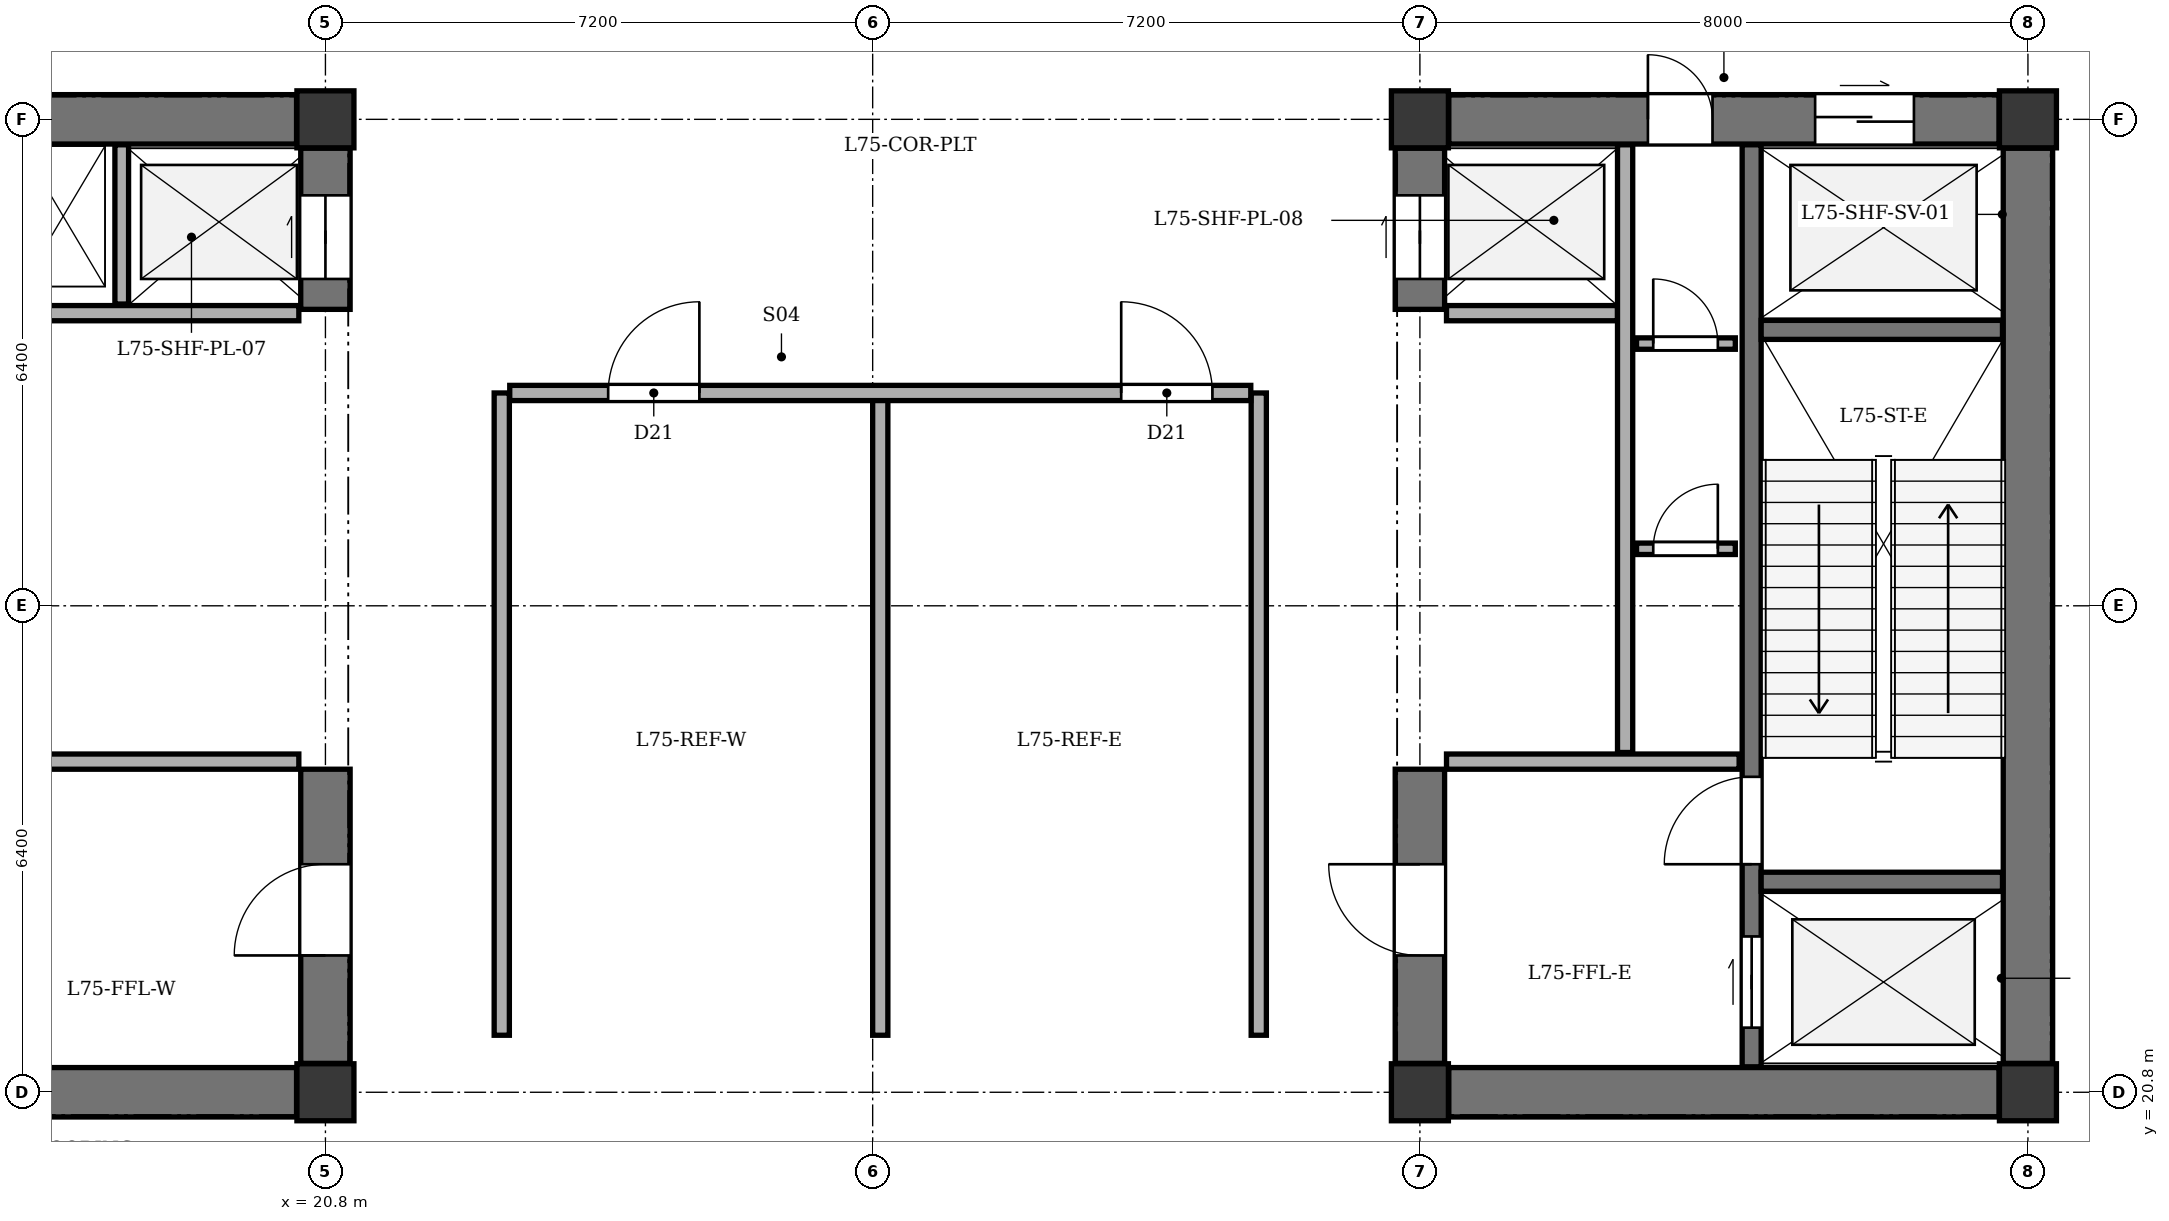
"""IFC4 building model, lengths in metres.
Left out: names, types, materials, properties, quantities, classifications, styles, units other than length and angle.
Written with IfcOpenShell. Run it as: python <this file> out.ifc"""

import sys

from ifc_helpers import new_model, si_unit, direction, frame, frame_2d, origin, origin_2d, place, context, subcontext, project, spatial, rectangle, extrude, element, fill, save


model = new_model("IFC4")
c1 = context("Model", 3, precision=1e-05, world=origin(), true_north=direction((0.0, 1.0)))
c2 = subcontext(c1, "Body", "Model", "MODEL_VIEW")
j1 = project(units=[si_unit("LENGTHUNIT", "METRE"), si_unit("PLANEANGLEUNIT", "RADIAN")], contexts=[c1])
p1 = place(None, origin())
s1 = spatial("IfcSite", under=j1, at=p1, CompositionType="ELEMENT")
p2 = place(p1, origin())
s2 = spatial("IfcBuilding", under=s1, at=p2, CompositionType="ELEMENT")
p3 = place(p2, frame((0.0, 0.0, 282.3)))
s3 = spatial("IfcBuildingStorey", under=s2, at=p3, CompositionType="ELEMENT", Elevation=282.3)
for number, where, z_axis, x_axis in (
    (1, (20.8, 20.8, 0.0), (0.0, 0.0, 1.0), (1.0, 0.0, 0.0)),
    (2, (20.8, 33.6, 0.0), (0.0, 0.0, 1.0), (1.0, 0.0, 0.0)),
    (3, (35.2, 20.8, 0.0), (0.0, 0.0, 1.0), (1.0, 0.0, 0.0)),
    (4, (43.2, 20.8, 0.0), (0.0, 0.0, 1.0), (1.0, 0.0, 0.0)),
    (5, (35.2, 33.6, 0.0), (0.0, 0.0, 1.0), (1.0, 0.0, 0.0)),
    (6, (43.2, 33.6, 0.0), (0.0, 0.0, 1.0), (1.0, 0.0, 0.0)),
):
    element("IfcColumn", number, at=place(p3, frame(where, z_axis=z_axis, x_axis=x_axis)), inside=s3, PredefinedType="COLUMN", context=c2, shape_type="SweptSolid", body=[
        extrude(rectangle(XDim=0.75, YDim=0.75, at=origin_2d()), origin(), (0.0, 0.0, 1.0), 5.1),
    ])
p4 = place(p3, frame((13.18, 20.8, 0.0), z_axis=(0.0, 0.0, 1.0), x_axis=(1.0, 0.0, 0.0)))
e7 = element("IfcWall", 7, at=p4, inside=s3, PredefinedType="SHEAR", context=c2, shape_type="SweptSolid", body=[
    extrude(rectangle(XDim=7.24, YDim=0.65, at=frame_2d((3.62, 0.0))), origin(), (0.0, 0.0, 1.0), 4.65),
])
p5 = place(p3, frame((13.18, 33.6, 0.0), z_axis=(0.0, 0.0, 1.0), x_axis=(1.0, 0.0, 0.0)))
e8 = element("IfcWall", 8, at=p5, inside=s3, PredefinedType="SHEAR", context=c2, shape_type="SweptSolid", body=[
    extrude(rectangle(XDim=7.24, YDim=0.65, at=frame_2d((3.62, 0.0))), origin(), (0.0, 0.0, 1.0), 4.65),
])
p6 = place(p5, frame((0.52, 0.0, 0.0)))
e9 = element("IfcOpeningElement", 9, at=p6, cuts=e8, PredefinedType="OPENING", context=c2, shape_type="SweptSolid", body=[
    extrude(rectangle(XDim=0.85, YDim=2.02, at=frame_2d((0.425, 1.01))), frame((0.0, 0.335, 0.0), z_axis=(0.0, -1.0, 0.0), x_axis=(1.0, 0.0, 0.0)), (0.0, 0.0, 1.0), 0.67),
])
p7 = place(p5, frame((1.82, 0.0, 0.0)))
e10 = element("IfcOpeningElement", 10, at=p7, cuts=e8, PredefinedType="OPENING", context=c2, shape_type="SweptSolid", body=[
    extrude(rectangle(XDim=0.85, YDim=2.02, at=frame_2d((0.425, 1.01))), frame((0.0, 0.335, 0.0), z_axis=(0.0, -1.0, 0.0), x_axis=(1.0, 0.0, 0.0)), (0.0, 0.0, 1.0), 0.67),
])
p8 = place(p3, frame((20.8, 21.18, 0.0), z_axis=(0.0, 0.0, 1.0), x_axis=(0.0, 1.0, 0.0)))
e11 = element("IfcWall", 11, at=p8, inside=s3, PredefinedType="SHEAR", context=c2, shape_type="SweptSolid", body=[
    extrude(rectangle(XDim=3.87, YDim=0.65, at=frame_2d((1.935, 0.0))), origin(), (0.0, 0.0, 1.0), 4.65),
])
p9 = place(p8, frame((1.42, 0.0, 0.0)))
e12 = element("IfcOpeningElement", 12, at=p9, cuts=e11, PredefinedType="OPENING", context=c2, shape_type="SweptSolid", body=[
    extrude(rectangle(XDim=1.2, YDim=2.15, at=frame_2d((0.6, 1.075))), frame((0.0, 0.335, 0.0), z_axis=(0.0, -1.0, 0.0), x_axis=(1.0, 0.0, 0.0)), (0.0, 0.0, 1.0), 0.67),
])
p10 = place(p3, frame((20.8, 31.1, 0.0), z_axis=(0.0, 0.0, 1.0), x_axis=(0.0, 1.0, 0.0)))
e13 = element("IfcWall", 13, at=p10, inside=s3, PredefinedType="SHEAR", context=c2, shape_type="SweptSolid", body=[
    extrude(rectangle(XDim=2.12, YDim=0.65, at=frame_2d((1.06, 0.0))), origin(), (0.0, 0.0, 1.0), 4.65),
])
p11 = place(p10, frame((0.4, 0.0, 0.0)))
e14 = element("IfcOpeningElement", 14, at=p11, cuts=e13, PredefinedType="OPENING", context=c2, shape_type="SweptSolid", body=[
    extrude(rectangle(XDim=1.1, YDim=2.1, at=frame_2d((0.55, 1.05))), frame((0.0, 0.335, 0.0), z_axis=(0.0, -1.0, 0.0), x_axis=(1.0, 0.0, 0.0)), (0.0, 0.0, 1.0), 0.67),
])
for number, where, z_axis, x_axis in (
    (15, (16.6, 25.15, 0.0), (0.0, 0.0, 1.0), (1.0, 0.0, 0.0)),
    (16, (16.6, 31.05, 0.0), (0.0, 0.0, 1.0), (1.0, 0.0, 0.0)),
):
    element("IfcWall", number, at=place(p3, frame(where, z_axis=z_axis, x_axis=x_axis)), inside=s3, PredefinedType="SOLIDWALL", context=c2, shape_type="SweptSolid", body=[
        extrude(rectangle(XDim=3.85, YDim=0.2, at=frame_2d((1.925, 0.0))), origin(), (0.0, 0.0, 1.0), 4.65),
    ])
p12 = place(p3, frame((18.12, 31.17, 0.0), z_axis=(0.0, 0.0, 1.0), x_axis=(0.0, 1.0, 0.0)))
e17 = element("IfcWall", 17, at=p12, inside=s3, PredefinedType="PARTITIONING", context=c2, shape_type="SweptSolid", body=[
    extrude(rectangle(XDim=2.095, YDim=0.18, at=frame_2d((1.047, 0.0))), origin(), (0.0, 0.0, 1.0), 4.65),
])
p13 = place(p3, frame((43.2, 21.18, 0.0), z_axis=(0.0, 0.0, 1.0), x_axis=(0.0, 1.0, 0.0)))
e18 = element("IfcWall", 18, at=p13, inside=s3, PredefinedType="SHEAR", context=c2, shape_type="SweptSolid", body=[
    extrude(rectangle(XDim=12.04, YDim=0.65, at=frame_2d((6.02, 0.0))), origin(), (0.0, 0.0, 1.0), 4.65),
])
p14 = place(p3, frame((35.58, 20.8, 0.0), z_axis=(0.0, 0.0, 1.0), x_axis=(1.0, 0.0, 0.0)))
e19 = element("IfcWall", 19, at=p14, inside=s3, PredefinedType="SHEAR", context=c2, shape_type="SweptSolid", body=[
    extrude(rectangle(XDim=7.24, YDim=0.65, at=frame_2d((3.62, 0.0))), origin(), (0.0, 0.0, 1.0), 4.65),
])
p15 = place(p3, frame((35.58, 33.6, 0.0), z_axis=(0.0, 0.0, 1.0), x_axis=(1.0, 0.0, 0.0)))
e20 = element("IfcWall", 20, at=p15, inside=s3, PredefinedType="SHEAR", context=c2, shape_type="SweptSolid", body=[
    extrude(rectangle(XDim=7.24, YDim=0.65, at=frame_2d((3.62, 0.0))), origin(), (0.0, 0.0, 1.0), 4.65),
])
p16 = place(p15, frame((4.82, 0.0, 0.0)))
e21 = element("IfcOpeningElement", 21, at=p16, cuts=e20, PredefinedType="OPENING", context=c2, shape_type="SweptSolid", body=[
    extrude(rectangle(XDim=1.3, YDim=2.15, at=frame_2d((0.65, 1.075))), frame((0.0, 0.335, 0.0), z_axis=(0.0, -1.0, 0.0), x_axis=(1.0, 0.0, 0.0)), (0.0, 0.0, 1.0), 0.67),
])
p17 = place(p15, frame((2.62, 0.0, 0.0)))
e22 = element("IfcOpeningElement", 22, at=p17, cuts=e20, PredefinedType="OPENING", context=c2, shape_type="SweptSolid", body=[
    extrude(rectangle(XDim=0.85, YDim=2.02, at=frame_2d((0.425, 1.01))), frame((0.0, 0.335, 0.0), z_axis=(0.0, -1.0, 0.0), x_axis=(1.0, 0.0, 0.0)), (0.0, 0.0, 1.0), 0.67),
])
p18 = place(p3, frame((35.2, 21.18, 0.0), z_axis=(0.0, 0.0, 1.0), x_axis=(0.0, 1.0, 0.0)))
e23 = element("IfcWall", 23, at=p18, inside=s3, PredefinedType="SHEAR", context=c2, shape_type="SweptSolid", body=[
    extrude(rectangle(XDim=3.87, YDim=0.65, at=frame_2d((1.935, 0.0))), origin(), (0.0, 0.0, 1.0), 4.65),
])
p19 = place(p18, frame((1.42, 0.0, 0.0)))
e24 = element("IfcOpeningElement", 24, at=p19, cuts=e23, PredefinedType="OPENING", context=c2, shape_type="SweptSolid", body=[
    extrude(rectangle(XDim=1.2, YDim=2.15, at=frame_2d((0.6, 1.075))), frame((0.0, 0.335, 0.0), z_axis=(0.0, -1.0, 0.0), x_axis=(1.0, 0.0, 0.0)), (0.0, 0.0, 1.0), 0.67),
])
p20 = place(p3, frame((35.2, 31.1, 0.0), z_axis=(0.0, 0.0, 1.0), x_axis=(0.0, 1.0, 0.0)))
e25 = element("IfcWall", 25, at=p20, inside=s3, PredefinedType="SHEAR", context=c2, shape_type="SweptSolid", body=[
    extrude(rectangle(XDim=2.12, YDim=0.65, at=frame_2d((1.06, 0.0))), origin(), (0.0, 0.0, 1.0), 4.65),
])
p21 = place(p20, frame((0.4, 0.0, 0.0)))
e26 = element("IfcOpeningElement", 26, at=p21, cuts=e25, PredefinedType="OPENING", context=c2, shape_type="SweptSolid", body=[
    extrude(rectangle(XDim=1.1, YDim=2.1, at=frame_2d((0.55, 1.05))), frame((0.0, 0.335, 0.0), z_axis=(0.0, -1.0, 0.0), x_axis=(1.0, 0.0, 0.0)), (0.0, 0.0, 1.0), 0.67),
])
p22 = place(p3, frame((39.565, 21.135, 0.0), z_axis=(0.0, 0.0, 1.0), x_axis=(0.0, 1.0, 0.0)))
e27 = element("IfcWall", 27, at=p22, inside=s3, PredefinedType="SHEAR", context=c2, shape_type="SweptSolid", body=[
    extrude(rectangle(XDim=12.13, YDim=0.25, at=frame_2d((6.065, 0.0))), origin(), (0.0, 0.0, 1.0), 4.65),
])
p23 = place(p22, frame((0.515, 0.0, 0.0)))
e28 = element("IfcOpeningElement", 28, at=p23, cuts=e27, PredefinedType="OPENING", context=c2, shape_type="SweptSolid", body=[
    extrude(rectangle(XDim=1.2, YDim=2.15, at=frame_2d((0.6, 1.075))), frame((0.0, 0.135, 0.0), z_axis=(0.0, -1.0, 0.0), x_axis=(1.0, 0.0, 0.0)), (0.0, 0.0, 1.0), 0.27),
])
p24 = place(p22, frame((2.665, 0.0, 0.0)))
e29 = element("IfcOpeningElement", 29, at=p24, cuts=e27, PredefinedType="OPENING", context=c2, shape_type="SweptSolid", body=[
    extrude(rectangle(XDim=1.15, YDim=2.15, at=frame_2d((0.575, 1.075))), frame((0.0, 0.135, 0.0), z_axis=(0.0, -1.0, 0.0), x_axis=(1.0, 0.0, 0.0)), (0.0, 0.0, 1.0), 0.27),
])
for number, where, z_axis, x_axis in (
    (30, (39.69, 23.57, 0.0), (0.0, 0.0, 1.0), (1.0, 0.0, 0.0)),
    (31, (39.69, 30.83, 0.0), (0.0, 0.0, 1.0), (1.0, 0.0, 0.0)),
):
    element("IfcWall", number, at=place(p3, frame(where, z_axis=z_axis, x_axis=x_axis)), inside=s3, PredefinedType="SHEAR", context=c2, shape_type="SweptSolid", body=[
        extrude(rectangle(XDim=3.175, YDim=0.25, at=frame_2d((1.587, 0.0))), origin(), (0.0, 0.0, 1.0), 4.65),
    ])
p25 = place(p3, frame((35.55, 25.15, 0.0), z_axis=(0.0, 0.0, 1.0), x_axis=(1.0, 0.0, 0.0)))
e32 = element("IfcWall", 32, at=p25, inside=s3, PredefinedType="SOLIDWALL", context=c2, shape_type="SweptSolid", body=[
    extrude(rectangle(XDim=3.85, YDim=0.2, at=frame_2d((1.925, 0.0))), origin(), (0.0, 0.0, 1.0), 4.65),
])
p26 = place(p3, frame((35.55, 31.05, 0.0), z_axis=(0.0, 0.0, 1.0), x_axis=(1.0, 0.0, 0.0)))
e33 = element("IfcWall", 33, at=p26, inside=s3, PredefinedType="SOLIDWALL", context=c2, shape_type="SweptSolid", body=[
    extrude(rectangle(XDim=2.25, YDim=0.2, at=frame_2d((1.125, 0.0))), origin(), (0.0, 0.0, 1.0), 4.65),
])
p27 = place(p3, frame((37.9, 25.27, 0.0), z_axis=(0.0, 0.0, 1.0), x_axis=(0.0, 1.0, 0.0)))
e34 = element("IfcWall", 34, at=p27, inside=s3, PredefinedType="SOLIDWALL", context=c2, shape_type="SweptSolid", body=[
    extrude(rectangle(XDim=7.995, YDim=0.2, at=frame_2d((3.998, 0.0))), origin(), (0.0, 0.0, 1.0), 4.65),
])
p28 = place(p3, frame((38.05, 27.95, 0.0), z_axis=(0.0, 0.0, 1.0), x_axis=(1.0, 0.0, 0.0)))
e35 = element("IfcWall", 35, at=p28, inside=s3, PredefinedType="PARTITIONING", context=c2, shape_type="SweptSolid", body=[
    extrude(rectangle(XDim=1.3, YDim=0.15, at=frame_2d((0.65, 0.0))), origin(), (0.0, 0.0, 1.0), 4.65),
])
p29 = place(p28, frame((0.22, 0.0, 0.0)))
e36 = element("IfcOpeningElement", 36, at=p29, cuts=e35, PredefinedType="OPENING", context=c2, shape_type="SweptSolid", body=[
    extrude(rectangle(XDim=0.85, YDim=2.02, at=frame_2d((0.425, 1.01))), frame((0.0, 0.085, 0.0), z_axis=(0.0, -1.0, 0.0), x_axis=(1.0, 0.0, 0.0)), (0.0, 0.0, 1.0), 0.17),
])
p30 = place(p3, frame((38.05, 30.65, 0.0), z_axis=(0.0, 0.0, 1.0), x_axis=(1.0, 0.0, 0.0)))
e37 = element("IfcWall", 37, at=p30, inside=s3, PredefinedType="PARTITIONING", context=c2, shape_type="SweptSolid", body=[
    extrude(rectangle(XDim=1.3, YDim=0.15, at=frame_2d((0.65, 0.0))), origin(), (0.0, 0.0, 1.0), 4.65),
])
p31 = place(p30, frame((0.22, 0.0, 0.0)))
e38 = element("IfcOpeningElement", 38, at=p31, cuts=e37, PredefinedType="OPENING", context=c2, shape_type="SweptSolid", body=[
    extrude(rectangle(XDim=0.85, YDim=2.02, at=frame_2d((0.425, 1.01))), frame((0.0, 0.085, 0.0), z_axis=(0.0, -1.0, 0.0), x_axis=(1.0, 0.0, 0.0)), (0.0, 0.0, 1.0), 0.17),
])
for number, where, z_axis, x_axis in (
    (39, (23.12, 21.55, 0.0), (0.0, 0.0, 1.0), (0.0, 1.0, 0.0)),
    (40, (33.08, 21.55, 0.0), (0.0, 0.0, 1.0), (0.0, 1.0, 0.0)),
):
    element("IfcWall", number, at=place(p3, frame(where, z_axis=z_axis, x_axis=x_axis)), inside=s3, PredefinedType="SOLIDWALL", context=c2, shape_type="SweptSolid", body=[
        extrude(rectangle(XDim=8.45, YDim=0.2, at=frame_2d((4.225, 0.0))), origin(), (0.0, 0.0, 1.0), 4.65),
    ])
p32 = place(p3, frame((28.1, 21.55, 0.0), z_axis=(0.0, 0.0, 1.0), x_axis=(0.0, 1.0, 0.0)))
e41 = element("IfcWall", 41, at=p32, inside=s3, PredefinedType="SOLIDWALL", context=c2, shape_type="SweptSolid", body=[
    extrude(rectangle(XDim=8.45, YDim=0.2, at=frame_2d((4.225, 0.0))), origin(), (0.0, 0.0, 1.0), 3.835),
])
p33 = place(p3, frame((23.225, 30.0, 0.0), z_axis=(0.0, 0.0, 1.0), x_axis=(1.0, 0.0, 0.0)))
e42 = element("IfcWall", 42, at=p33, inside=s3, PredefinedType="SOLIDWALL", context=c2, shape_type="SweptSolid", body=[
    extrude(rectangle(XDim=9.75, YDim=0.2, at=frame_2d((4.875, 0.0))), origin(), (0.0, 0.0, 1.0), 4.65),
])
p34 = place(p33, frame((1.295, 0.0, 0.0)))
e43 = element("IfcOpeningElement", 43, at=p34, cuts=e42, PredefinedType="OPENING", context=c2, shape_type="SweptSolid", body=[
    extrude(rectangle(XDim=1.2, YDim=2.15, at=frame_2d((0.6, 1.075))), frame((0.0, 0.11, 0.0), z_axis=(0.0, -1.0, 0.0), x_axis=(1.0, 0.0, 0.0)), (0.0, 0.0, 1.0), 0.22),
])
p35 = place(p33, frame((8.045, 0.0, 0.0)))
e44 = element("IfcOpeningElement", 44, at=p35, cuts=e42, PredefinedType="OPENING", context=c2, shape_type="SweptSolid", body=[
    extrude(rectangle(XDim=1.2, YDim=2.15, at=frame_2d((0.6, 1.075))), frame((0.0, 0.11, 0.0), z_axis=(0.0, -1.0, 0.0), x_axis=(1.0, 0.0, 0.0)), (0.0, 0.0, 1.0), 0.22),
])
p36 = place(p9, origin())
e45 = element("IfcDoor", 45, at=p36, inside=s3, OperationType="SINGLE_SWING_LEFT", PredefinedType="DOOR", context=c2, shape_type="SweptSolid", body=[
    extrude(rectangle(XDim=1.2, YDim=2.15, at=frame_2d((0.6, 1.075))), frame((0.0, 0.025, 0.0), z_axis=(0.0, -1.0, 0.0), x_axis=(1.0, 0.0, 0.0)), (0.0, 0.0, 1.0), 0.05),
])
fill(e12, e45)
p37 = place(p11, origin())
e46 = element("IfcDoor", 46, at=p37, inside=s3, OperationType="DOUBLE_DOOR_SLIDING", PredefinedType="DOOR", context=c2, shape_type="SweptSolid", body=[
    extrude(rectangle(XDim=1.1, YDim=2.1, at=frame_2d((0.55, 1.05))), frame((0.0, 0.025, 0.0), z_axis=(0.0, -1.0, 0.0), x_axis=(1.0, 0.0, 0.0)), (0.0, 0.0, 1.0), 0.05),
])
fill(e14, e46)
p38 = place(p16, origin())
e47 = element("IfcDoor", 47, at=p38, inside=s3, OperationType="DOUBLE_DOOR_SLIDING", PredefinedType="DOOR", context=c2, shape_type="SweptSolid", body=[
    extrude(rectangle(XDim=1.3, YDim=2.15, at=frame_2d((0.65, 1.075))), frame((0.0, 0.025, 0.0), z_axis=(0.0, -1.0, 0.0), x_axis=(1.0, 0.0, 0.0)), (0.0, 0.0, 1.0), 0.05),
])
fill(e21, e47)
p39 = place(p17, origin())
e48 = element("IfcDoor", 48, at=p39, inside=s3, OperationType="SINGLE_SWING_LEFT", PredefinedType="DOOR", context=c2, shape_type="SweptSolid", body=[
    extrude(rectangle(XDim=0.85, YDim=2.02, at=frame_2d((0.425, 1.01))), frame((0.0, 0.025, 0.0), z_axis=(0.0, -1.0, 0.0), x_axis=(1.0, 0.0, 0.0)), (0.0, 0.0, 1.0), 0.05),
])
fill(e22, e48)
p40 = place(p19, origin())
e49 = element("IfcDoor", 49, at=p40, inside=s3, OperationType="SINGLE_SWING_RIGHT", PredefinedType="DOOR", context=c2, shape_type="SweptSolid", body=[
    extrude(rectangle(XDim=1.2, YDim=2.15, at=frame_2d((0.6, 1.075))), frame((0.0, 0.025, 0.0), z_axis=(0.0, -1.0, 0.0), x_axis=(1.0, 0.0, 0.0)), (0.0, 0.0, 1.0), 0.05),
])
fill(e24, e49)
p41 = place(p21, origin())
e50 = element("IfcDoor", 50, at=p41, inside=s3, OperationType="DOUBLE_DOOR_SLIDING", PredefinedType="DOOR", context=c2, shape_type="SweptSolid", body=[
    extrude(rectangle(XDim=1.1, YDim=2.1, at=frame_2d((0.55, 1.05))), frame((0.0, 0.025, 0.0), z_axis=(0.0, -1.0, 0.0), x_axis=(1.0, 0.0, 0.0)), (0.0, 0.0, 1.0), 0.05),
])
fill(e26, e50)
p42 = place(p23, origin())
e51 = element("IfcDoor", 51, at=p42, inside=s3, OperationType="DOUBLE_DOOR_SLIDING", PredefinedType="DOOR", context=c2, shape_type="SweptSolid", body=[
    extrude(rectangle(XDim=1.2, YDim=2.15, at=frame_2d((0.6, 1.075))), frame((0.0, 0.025, 0.0), z_axis=(0.0, -1.0, 0.0), x_axis=(1.0, 0.0, 0.0)), (0.0, 0.0, 1.0), 0.05),
])
fill(e28, e51)
p43 = place(p24, origin())
e52 = element("IfcDoor", 52, at=p43, inside=s3, OperationType="SINGLE_SWING_LEFT", PredefinedType="DOOR", context=c2, shape_type="SweptSolid", body=[
    extrude(rectangle(XDim=1.15, YDim=2.15, at=frame_2d((0.575, 1.075))), frame((0.0, 0.025, 0.0), z_axis=(0.0, -1.0, 0.0), x_axis=(1.0, 0.0, 0.0)), (0.0, 0.0, 1.0), 0.05),
])
fill(e29, e52)
p44 = place(p29, origin())
e53 = element("IfcDoor", 53, at=p44, inside=s3, OperationType="SINGLE_SWING_RIGHT", PredefinedType="DOOR", context=c2, shape_type="SweptSolid", body=[
    extrude(rectangle(XDim=0.85, YDim=2.02, at=frame_2d((0.425, 1.01))), frame((0.0, 0.025, 0.0), z_axis=(0.0, -1.0, 0.0), x_axis=(1.0, 0.0, 0.0)), (0.0, 0.0, 1.0), 0.05),
])
fill(e36, e53)
p45 = place(p31, origin())
e54 = element("IfcDoor", 54, at=p45, inside=s3, OperationType="SINGLE_SWING_LEFT", PredefinedType="DOOR", context=c2, shape_type="SweptSolid", body=[
    extrude(rectangle(XDim=0.85, YDim=2.02, at=frame_2d((0.425, 1.01))), frame((0.0, 0.025, 0.0), z_axis=(0.0, -1.0, 0.0), x_axis=(1.0, 0.0, 0.0)), (0.0, 0.0, 1.0), 0.05),
])
fill(e38, e54)
p46 = place(p34, origin())
e55 = element("IfcDoor", 55, at=p46, inside=s3, OperationType="SINGLE_SWING_RIGHT", PredefinedType="DOOR", context=c2, shape_type="SweptSolid", body=[
    extrude(rectangle(XDim=1.2, YDim=2.15, at=frame_2d((0.6, 1.075))), frame((0.0, 0.025, 0.0), z_axis=(0.0, -1.0, 0.0), x_axis=(1.0, 0.0, 0.0)), (0.0, 0.0, 1.0), 0.05),
])
fill(e43, e55)
p47 = place(p35, origin())
e56 = element("IfcDoor", 56, at=p47, inside=s3, OperationType="SINGLE_SWING_LEFT", PredefinedType="DOOR", context=c2, shape_type="SweptSolid", body=[
    extrude(rectangle(XDim=1.2, YDim=2.15, at=frame_2d((0.6, 1.075))), frame((0.0, 0.025, 0.0), z_axis=(0.0, -1.0, 0.0), x_axis=(1.0, 0.0, 0.0)), (0.0, 0.0, 1.0), 0.05),
])
fill(e44, e56)
save(model, sys.argv[1])
